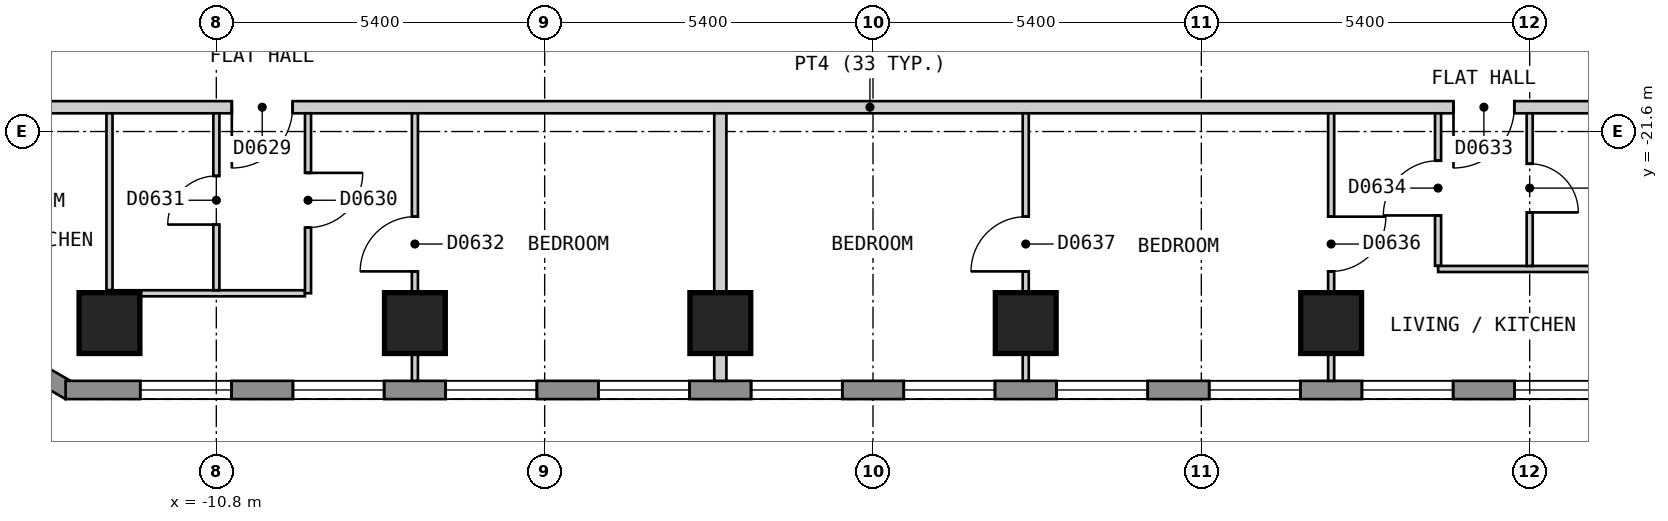
"""IFC4 building model, lengths in metres.
Left out: names, types, materials, properties, quantities, classifications, styles, units other than length and angle.
Written with IfcOpenShell. Run it as: python <this file> out.ifc"""

import sys

from ifc_helpers import new_model, si_unit, direction, frame, frame_2d, origin, origin_2d, place, context, subcontext, project, spatial, polyline, rectangle, outline, extrude, element, fill, save


model = new_model("IFC4")
c1 = context("Model", 3, precision=1e-05, world=origin(), true_north=direction((0.0, 1.0)))
c2 = subcontext(c1, "Body", "Model", "MODEL_VIEW")
j1 = project(units=[si_unit("LENGTHUNIT", "METRE"), si_unit("PLANEANGLEUNIT", "RADIAN")], contexts=[c1])
p1 = place(None, origin())
s1 = spatial("IfcSite", under=j1, at=p1, CompositionType="ELEMENT")
p2 = place(p1, origin())
s2 = spatial("IfcBuilding", under=s1, at=p2, CompositionType="ELEMENT")
p3 = place(p2, frame((0.0, 0.0, 75.0)))
s3 = spatial("IfcBuildingStorey", under=s2, at=p3, CompositionType="ELEMENT", Elevation=75.0)
for number, where, z_axis, x_axis in (
    (1, (-12.557, -24.75, 0.0), (0.0, 0.0, 1.0), (1.0, 0.0, 0.0)),
    (2, (-7.534, -24.75, 0.0), (0.0, 0.0, 1.0), (1.0, 0.0, 0.0)),
    (3, (-2.511, -24.75, 0.0), (0.0, 0.0, 1.0), (1.0, 0.0, 0.0)),
    (4, (2.512, -24.75, 0.0), (0.0, 0.0, 1.0), (1.0, 0.0, 0.0)),
    (5, (7.535, -24.75, 0.0), (0.0, 0.0, 1.0), (1.0, 0.0, 0.0)),
):
    element("IfcColumn", number, at=place(p3, frame(where, z_axis=z_axis, x_axis=x_axis)), inside=s3, PredefinedType="COLUMN", context=c2, shape_type="SweptSolid", body=[
        extrude(rectangle(XDim=1.0, YDim=1.0, at=origin_2d()), origin(), (0.0, 0.0, 1.0), 3.0),
    ])
p4 = place(p3, frame((-17.534, -23.37, 0.0), z_axis=(0.0, 0.0, 1.0), x_axis=(0.866010750942, -0.50002537861, 0.0)))
e6 = element("IfcWall", 6, at=p4, inside=s3, PredefinedType="SOLIDWALL", context=c2, shape_type="SweptSolid", body=[
    extrude(outline(polyline([(0.0, -0.15), (5.0, -0.15), (4.919, 0.15), (0.08, 0.15), (0.0, -0.15)])), origin(), (0.0, 0.0, 1.0), 2.7),
])
p5 = place(p4, frame((0.65, 0.0, 0.15)))
e7 = element("IfcOpeningElement", 7, at=p5, cuts=e6, PredefinedType="OPENING", context=c2, shape_type="SweptSolid", body=[
    extrude(rectangle(XDim=1.2, YDim=2.1, at=frame_2d((0.6, 1.05))), frame((0.0, 0.16, 0.0), z_axis=(0.0, -1.0, 0.0), x_axis=(1.0, 0.0, 0.0)), (0.0, 0.0, 1.0), 0.32),
])
p6 = place(p4, frame((3.15, 0.0, 0.15)))
e8 = element("IfcOpeningElement", 8, at=p6, cuts=e6, PredefinedType="OPENING", context=c2, shape_type="SweptSolid", body=[
    extrude(rectangle(XDim=1.2, YDim=2.1, at=frame_2d((0.6, 1.05))), frame((0.0, 0.16, 0.0), z_axis=(0.0, -1.0, 0.0), x_axis=(1.0, 0.0, 0.0)), (0.0, 0.0, 1.0), 0.32),
])
p7 = place(p3, frame((-13.279, -25.85, 0.0), z_axis=(0.0, 0.0, 1.0), x_axis=(1.0, 0.0, 0.0)))
e9 = element("IfcWall", 9, at=p7, inside=s3, PredefinedType="SOLIDWALL", context=c2, shape_type="SweptSolid", body=[
    extrude(outline(polyline([(0.0, -0.15), (26.558, -0.15), (26.478, 0.15), (0.08, 0.15), (0.0, -0.15)])), origin(), (0.0, 0.0, 1.0), 2.7),
])
p8 = place(p7, frame((1.228, 0.0, 0.15)))
e10 = element("IfcOpeningElement", 10, at=p8, cuts=e9, PredefinedType="OPENING", context=c2, shape_type="SweptSolid", body=[
    extrude(rectangle(XDim=1.5, YDim=2.1, at=frame_2d((0.75, 1.05))), frame((0.0, 0.16, 0.0), z_axis=(0.0, -1.0, 0.0), x_axis=(1.0, 0.0, 0.0)), (0.0, 0.0, 1.0), 0.32),
])
p9 = place(p7, frame((3.739, 0.0, 0.15)))
e11 = element("IfcOpeningElement", 11, at=p9, cuts=e9, PredefinedType="OPENING", context=c2, shape_type="SweptSolid", body=[
    extrude(rectangle(XDim=1.5, YDim=2.1, at=frame_2d((0.75, 1.05))), frame((0.0, 0.16, 0.0), z_axis=(0.0, -1.0, 0.0), x_axis=(1.0, 0.0, 0.0)), (0.0, 0.0, 1.0), 0.32),
])
p10 = place(p7, frame((6.251, 0.0, 0.15)))
e12 = element("IfcOpeningElement", 12, at=p10, cuts=e9, PredefinedType="OPENING", context=c2, shape_type="SweptSolid", body=[
    extrude(rectangle(XDim=1.5, YDim=2.1, at=frame_2d((0.75, 1.05))), frame((0.0, 0.16, 0.0), z_axis=(0.0, -1.0, 0.0), x_axis=(1.0, 0.0, 0.0)), (0.0, 0.0, 1.0), 0.32),
])
p11 = place(p7, frame((8.762, 0.0, 0.15)))
e13 = element("IfcOpeningElement", 13, at=p11, cuts=e9, PredefinedType="OPENING", context=c2, shape_type="SweptSolid", body=[
    extrude(rectangle(XDim=1.5, YDim=2.1, at=frame_2d((0.75, 1.05))), frame((0.0, 0.16, 0.0), z_axis=(0.0, -1.0, 0.0), x_axis=(1.0, 0.0, 0.0)), (0.0, 0.0, 1.0), 0.32),
])
p12 = place(p7, frame((11.274, 0.0, 0.15)))
e14 = element("IfcOpeningElement", 14, at=p12, cuts=e9, PredefinedType="OPENING", context=c2, shape_type="SweptSolid", body=[
    extrude(rectangle(XDim=1.5, YDim=2.1, at=frame_2d((0.75, 1.05))), frame((0.0, 0.16, 0.0), z_axis=(0.0, -1.0, 0.0), x_axis=(1.0, 0.0, 0.0)), (0.0, 0.0, 1.0), 0.32),
])
p13 = place(p7, frame((13.785, 0.0, 0.15)))
e15 = element("IfcOpeningElement", 15, at=p13, cuts=e9, PredefinedType="OPENING", context=c2, shape_type="SweptSolid", body=[
    extrude(rectangle(XDim=1.5, YDim=2.1, at=frame_2d((0.75, 1.05))), frame((0.0, 0.16, 0.0), z_axis=(0.0, -1.0, 0.0), x_axis=(1.0, 0.0, 0.0)), (0.0, 0.0, 1.0), 0.32),
])
p14 = place(p7, frame((16.297, 0.0, 0.15)))
e16 = element("IfcOpeningElement", 16, at=p14, cuts=e9, PredefinedType="OPENING", context=c2, shape_type="SweptSolid", body=[
    extrude(rectangle(XDim=1.5, YDim=2.1, at=frame_2d((0.75, 1.05))), frame((0.0, 0.16, 0.0), z_axis=(0.0, -1.0, 0.0), x_axis=(1.0, 0.0, 0.0)), (0.0, 0.0, 1.0), 0.32),
])
p15 = place(p7, frame((18.808, 0.0, 0.15)))
e17 = element("IfcOpeningElement", 17, at=p15, cuts=e9, PredefinedType="OPENING", context=c2, shape_type="SweptSolid", body=[
    extrude(rectangle(XDim=1.5, YDim=2.1, at=frame_2d((0.75, 1.05))), frame((0.0, 0.16, 0.0), z_axis=(0.0, -1.0, 0.0), x_axis=(1.0, 0.0, 0.0)), (0.0, 0.0, 1.0), 0.32),
])
p16 = place(p7, frame((21.32, 0.0, 0.15)))
e18 = element("IfcOpeningElement", 18, at=p16, cuts=e9, PredefinedType="OPENING", context=c2, shape_type="SweptSolid", body=[
    extrude(rectangle(XDim=1.5, YDim=2.1, at=frame_2d((0.75, 1.05))), frame((0.0, 0.16, 0.0), z_axis=(0.0, -1.0, 0.0), x_axis=(1.0, 0.0, 0.0)), (0.0, 0.0, 1.0), 0.32),
])
p17 = place(p7, frame((23.831, 0.0, 0.15)))
e19 = element("IfcOpeningElement", 19, at=p17, cuts=e9, PredefinedType="OPENING", context=c2, shape_type="SweptSolid", body=[
    extrude(rectangle(XDim=1.5, YDim=2.1, at=frame_2d((0.75, 1.05))), frame((0.0, 0.16, 0.0), z_axis=(0.0, -1.0, 0.0), x_axis=(1.0, 0.0, 0.0)), (0.0, 0.0, 1.0), 0.32),
])
p18 = place(p3, frame((-15.499, -21.2, 0.0), z_axis=(0.0, 0.0, 1.0), x_axis=(1.0, 0.0, 0.0)))
e20 = element("IfcWall", 20, at=p18, inside=s3, PredefinedType="PARTITIONING", context=c2, shape_type="SweptSolid", body=[
    extrude(rectangle(XDim=30.898, YDim=0.2, at=frame_2d((15.449, 0.0))), origin(), (0.0, 0.0, 1.0), 2.7),
])
p19 = place(p18, frame((4.954, 0.0, 0.0)))
e21 = element("IfcOpeningElement", 21, at=p19, cuts=e20, PredefinedType="OPENING", context=c2, shape_type="SweptSolid", body=[
    extrude(rectangle(XDim=1.0, YDim=2.1, at=frame_2d((0.5, 1.05))), frame((0.0, 0.11, 0.0), z_axis=(0.0, -1.0, 0.0), x_axis=(1.0, 0.0, 0.0)), (0.0, 0.0, 1.0), 0.22),
])
p20 = place(p18, frame((25.046, 0.0, 0.0)))
e22 = element("IfcOpeningElement", 22, at=p20, cuts=e20, PredefinedType="OPENING", context=c2, shape_type="SweptSolid", body=[
    extrude(rectangle(XDim=1.0, YDim=2.1, at=frame_2d((0.5, 1.05))), frame((0.0, 0.11, 0.0), z_axis=(0.0, -1.0, 0.0), x_axis=(1.0, 0.0, 0.0)), (0.0, 0.0, 1.0), 0.22),
])
p21 = place(p3, frame((-7.534, -21.3, 0.0), z_axis=(0.0, 0.0, 1.0), x_axis=(0.0, -1.0, 0.0)))
e23 = element("IfcWall", 23, at=p21, inside=s3, PredefinedType="PARTITIONING", context=c2, shape_type="SweptSolid", body=[
    extrude(rectangle(XDim=4.4, YDim=0.1, at=frame_2d((2.2, 0.0))), origin(), (0.0, 0.0, 1.0), 2.7),
])
p22 = place(p21, frame((1.7, 0.0, 0.0)))
e24 = element("IfcOpeningElement", 24, at=p22, cuts=e23, PredefinedType="OPENING", context=c2, shape_type="SweptSolid", body=[
    extrude(rectangle(XDim=0.9, YDim=2.1, at=frame_2d((0.45, 1.05))), frame((0.0, 0.06, 0.0), z_axis=(0.0, -1.0, 0.0), x_axis=(1.0, 0.0, 0.0)), (0.0, 0.0, 1.0), 0.12),
])
p23 = place(p3, frame((-12.557, -21.3, 0.0), z_axis=(0.0, 0.0, 1.0), x_axis=(0.0, -1.0, 0.0)))
e25 = element("IfcWall", 25, at=p23, inside=s3, PredefinedType="PARTITIONING", context=c2, shape_type="SweptSolid", body=[
    extrude(rectangle(XDim=2.909, YDim=0.1, at=frame_2d((1.455, 0.0))), origin(), (0.0, 0.0, 1.0), 2.7),
])
p24 = place(p3, frame((9.293, -21.3, 0.0), z_axis=(0.0, 0.0, 1.0), x_axis=(0.0, -1.0, 0.0)))
e26 = element("IfcWall", 26, at=p24, inside=s3, PredefinedType="PARTITIONING", context=c2, shape_type="SweptSolid", body=[
    extrude(rectangle(XDim=2.509, YDim=0.1, at=frame_2d((1.254, 0.0))), origin(), (0.0, 0.0, 1.0), 2.7),
])
p25 = place(p24, frame((0.78, 0.0, 0.0)))
e27 = element("IfcOpeningElement", 27, at=p25, cuts=e26, PredefinedType="OPENING", context=c2, shape_type="SweptSolid", body=[
    extrude(rectangle(XDim=0.9, YDim=2.1, at=frame_2d((0.45, 1.05))), frame((0.0, 0.06, 0.0), z_axis=(0.0, -1.0, 0.0), x_axis=(1.0, 0.0, 0.0)), (0.0, 0.0, 1.0), 0.12),
])
p26 = place(p3, frame((9.294, -23.86, 0.0), z_axis=(0.0, 0.0, 1.0), x_axis=(1.0, 0.0, 0.0)))
e28 = element("IfcWall", 28, at=p26, inside=s3, PredefinedType="PARTITIONING", context=c2, shape_type="SweptSolid", body=[
    extrude(rectangle(XDim=3.164, YDim=0.1, at=frame_2d((1.582, 0.0))), origin(), (0.0, 0.0, 1.0), 2.7),
])
p27 = place(p3, frame((-12.556, -24.26, 0.0), z_axis=(0.0, 0.0, 1.0), x_axis=(1.0, 0.0, 0.0)))
e29 = element("IfcWall", 29, at=p27, inside=s3, PredefinedType="PARTITIONING", context=c2, shape_type="SweptSolid", body=[
    extrude(rectangle(XDim=3.213, YDim=0.1, at=frame_2d((1.606, 0.0))), origin(), (0.0, 0.0, 1.0), 2.7),
])
p28 = place(p3, frame((7.535, -25.7, 0.0), z_axis=(0.0, 0.0, 1.0), x_axis=(0.0, 1.0, 0.0)))
e30 = element("IfcWall", 30, at=p28, inside=s3, PredefinedType="PARTITIONING", context=c2, shape_type="SweptSolid", body=[
    extrude(rectangle(XDim=4.4, YDim=0.1, at=frame_2d((2.2, 0.0))), origin(), (0.0, 0.0, 1.0), 2.7),
])
p29 = place(p28, frame((1.8, 0.0, 0.0)))
e31 = element("IfcOpeningElement", 31, at=p29, cuts=e30, PredefinedType="OPENING", context=c2, shape_type="SweptSolid", body=[
    extrude(rectangle(XDim=0.9, YDim=2.1, at=frame_2d((0.45, 1.05))), frame((0.0, 0.06, 0.0), z_axis=(0.0, -1.0, 0.0), x_axis=(1.0, 0.0, 0.0)), (0.0, 0.0, 1.0), 0.12),
])
p30 = place(p3, frame((10.8, -23.81, 0.0), z_axis=(0.0, 0.0, 1.0), x_axis=(0.0, 1.0, 0.0)))
e32 = element("IfcWall", 32, at=p30, inside=s3, PredefinedType="PARTITIONING", context=c2, shape_type="SweptSolid", body=[
    extrude(rectangle(XDim=2.51, YDim=0.1, at=frame_2d((1.255, 0.0))), origin(), (0.0, 0.0, 1.0), 2.7),
])
p31 = place(p30, frame((0.88, 0.0, 0.0)))
e33 = element("IfcOpeningElement", 33, at=p31, cuts=e32, PredefinedType="OPENING", context=c2, shape_type="SweptSolid", body=[
    extrude(rectangle(XDim=0.8, YDim=2.1, at=frame_2d((0.4, 1.05))), frame((0.0, 0.06, 0.0), z_axis=(0.0, -1.0, 0.0), x_axis=(1.0, 0.0, 0.0)), (0.0, 0.0, 1.0), 0.12),
])
p32 = place(p3, frame((2.512, -25.7, 0.0), z_axis=(0.0, 0.0, 1.0), x_axis=(0.0, 1.0, 0.0)))
e34 = element("IfcWall", 34, at=p32, inside=s3, PredefinedType="PARTITIONING", context=c2, shape_type="SweptSolid", body=[
    extrude(rectangle(XDim=4.4, YDim=0.1, at=frame_2d((2.2, 0.0))), origin(), (0.0, 0.0, 1.0), 2.7),
])
p33 = place(p32, frame((1.8, 0.0, 0.0)))
e35 = element("IfcOpeningElement", 35, at=p33, cuts=e34, PredefinedType="OPENING", context=c2, shape_type="SweptSolid", body=[
    extrude(rectangle(XDim=0.9, YDim=2.1, at=frame_2d((0.45, 1.05))), frame((0.0, 0.06, 0.0), z_axis=(0.0, -1.0, 0.0), x_axis=(1.0, 0.0, 0.0)), (0.0, 0.0, 1.0), 0.12),
])
p34 = place(p3, frame((-9.292, -24.259, 0.0), z_axis=(0.0, 0.0, 1.0), x_axis=(0.0, 1.0, 0.0)))
e36 = element("IfcWall", 36, at=p34, inside=s3, PredefinedType="PARTITIONING", context=c2, shape_type="SweptSolid", body=[
    extrude(rectangle(XDim=2.959, YDim=0.1, at=frame_2d((1.479, 0.0))), origin(), (0.0, 0.0, 1.0), 2.7),
])
p35 = place(p34, frame((1.079, 0.0, 0.0)))
e37 = element("IfcOpeningElement", 37, at=p35, cuts=e36, PredefinedType="OPENING", context=c2, shape_type="SweptSolid", body=[
    extrude(rectangle(XDim=0.9, YDim=2.1, at=frame_2d((0.45, 1.05))), frame((0.0, 0.06, 0.0), z_axis=(0.0, -1.0, 0.0), x_axis=(1.0, 0.0, 0.0)), (0.0, 0.0, 1.0), 0.12),
])
p36 = place(p3, frame((-10.799, -24.21, 0.0), z_axis=(0.0, 0.0, 1.0), x_axis=(0.0, 1.0, 0.0)))
e38 = element("IfcWall", 38, at=p36, inside=s3, PredefinedType="PARTITIONING", context=c2, shape_type="SweptSolid", body=[
    extrude(rectangle(XDim=2.91, YDim=0.1, at=frame_2d((1.455, 0.0))), origin(), (0.0, 0.0, 1.0), 2.7),
])
p37 = place(p36, frame((1.08, 0.0, 0.0)))
e39 = element("IfcOpeningElement", 39, at=p37, cuts=e38, PredefinedType="OPENING", context=c2, shape_type="SweptSolid", body=[
    extrude(rectangle(XDim=0.8, YDim=2.1, at=frame_2d((0.4, 1.05))), frame((0.0, 0.06, 0.0), z_axis=(0.0, -1.0, 0.0), x_axis=(1.0, 0.0, 0.0)), (0.0, 0.0, 1.0), 0.12),
])
p38 = place(p3, frame((-2.511, -25.7, 0.0), z_axis=(0.0, 0.0, 1.0), x_axis=(0.0, 1.0, 0.0)))
e40 = element("IfcWall", 40, at=p38, inside=s3, PredefinedType="PARTITIONING", context=c2, shape_type="SweptSolid", body=[
    extrude(rectangle(XDim=4.4, YDim=0.2, at=frame_2d((2.2, 0.0))), origin(), (0.0, 0.0, 1.0), 2.7),
])
p39 = place(p8, origin())
e41 = element("IfcWindow", 41, at=p39, inside=s3, PartitioningType="SINGLE_PANEL", PredefinedType="WINDOW", context=c2, shape_type="SweptSolid", body=[
    extrude(rectangle(XDim=1.5, YDim=2.1, at=frame_2d((0.75, 1.05))), frame((0.0, 0.03, 0.0), z_axis=(0.0, -1.0, 0.0), x_axis=(1.0, 0.0, 0.0)), (0.0, 0.0, 1.0), 0.06),
])
fill(e10, e41)
p40 = place(p9, origin())
e42 = element("IfcWindow", 42, at=p40, inside=s3, PartitioningType="SINGLE_PANEL", PredefinedType="WINDOW", context=c2, shape_type="SweptSolid", body=[
    extrude(rectangle(XDim=1.5, YDim=2.1, at=frame_2d((0.75, 1.05))), frame((0.0, 0.03, 0.0), z_axis=(0.0, -1.0, 0.0), x_axis=(1.0, 0.0, 0.0)), (0.0, 0.0, 1.0), 0.06),
])
fill(e11, e42)
p41 = place(p10, origin())
e43 = element("IfcWindow", 43, at=p41, inside=s3, PartitioningType="SINGLE_PANEL", PredefinedType="WINDOW", context=c2, shape_type="SweptSolid", body=[
    extrude(rectangle(XDim=1.5, YDim=2.1, at=frame_2d((0.75, 1.05))), frame((0.0, 0.03, 0.0), z_axis=(0.0, -1.0, 0.0), x_axis=(1.0, 0.0, 0.0)), (0.0, 0.0, 1.0), 0.06),
])
fill(e12, e43)
p42 = place(p11, origin())
e44 = element("IfcWindow", 44, at=p42, inside=s3, PartitioningType="SINGLE_PANEL", PredefinedType="WINDOW", context=c2, shape_type="SweptSolid", body=[
    extrude(rectangle(XDim=1.5, YDim=2.1, at=frame_2d((0.75, 1.05))), frame((0.0, 0.03, 0.0), z_axis=(0.0, -1.0, 0.0), x_axis=(1.0, 0.0, 0.0)), (0.0, 0.0, 1.0), 0.06),
])
fill(e13, e44)
p43 = place(p12, origin())
e45 = element("IfcWindow", 45, at=p43, inside=s3, PartitioningType="SINGLE_PANEL", PredefinedType="WINDOW", context=c2, shape_type="SweptSolid", body=[
    extrude(rectangle(XDim=1.5, YDim=2.1, at=frame_2d((0.75, 1.05))), frame((0.0, 0.03, 0.0), z_axis=(0.0, -1.0, 0.0), x_axis=(1.0, 0.0, 0.0)), (0.0, 0.0, 1.0), 0.06),
])
fill(e14, e45)
p44 = place(p13, origin())
e46 = element("IfcWindow", 46, at=p44, inside=s3, PartitioningType="SINGLE_PANEL", PredefinedType="WINDOW", context=c2, shape_type="SweptSolid", body=[
    extrude(rectangle(XDim=1.5, YDim=2.1, at=frame_2d((0.75, 1.05))), frame((0.0, 0.03, 0.0), z_axis=(0.0, -1.0, 0.0), x_axis=(1.0, 0.0, 0.0)), (0.0, 0.0, 1.0), 0.06),
])
fill(e15, e46)
p45 = place(p14, origin())
e47 = element("IfcWindow", 47, at=p45, inside=s3, PartitioningType="SINGLE_PANEL", PredefinedType="WINDOW", context=c2, shape_type="SweptSolid", body=[
    extrude(rectangle(XDim=1.5, YDim=2.1, at=frame_2d((0.75, 1.05))), frame((0.0, 0.03, 0.0), z_axis=(0.0, -1.0, 0.0), x_axis=(1.0, 0.0, 0.0)), (0.0, 0.0, 1.0), 0.06),
])
fill(e16, e47)
p46 = place(p15, origin())
e48 = element("IfcWindow", 48, at=p46, inside=s3, PartitioningType="SINGLE_PANEL", PredefinedType="WINDOW", context=c2, shape_type="SweptSolid", body=[
    extrude(rectangle(XDim=1.5, YDim=2.1, at=frame_2d((0.75, 1.05))), frame((0.0, 0.03, 0.0), z_axis=(0.0, -1.0, 0.0), x_axis=(1.0, 0.0, 0.0)), (0.0, 0.0, 1.0), 0.06),
])
fill(e17, e48)
p47 = place(p16, origin())
e49 = element("IfcWindow", 49, at=p47, inside=s3, PartitioningType="SINGLE_PANEL", PredefinedType="WINDOW", context=c2, shape_type="SweptSolid", body=[
    extrude(rectangle(XDim=1.5, YDim=2.1, at=frame_2d((0.75, 1.05))), frame((0.0, 0.03, 0.0), z_axis=(0.0, -1.0, 0.0), x_axis=(1.0, 0.0, 0.0)), (0.0, 0.0, 1.0), 0.06),
])
fill(e18, e49)
p48 = place(p17, origin())
e50 = element("IfcWindow", 50, at=p48, inside=s3, PartitioningType="SINGLE_PANEL", PredefinedType="WINDOW", context=c2, shape_type="SweptSolid", body=[
    extrude(rectangle(XDim=1.5, YDim=2.1, at=frame_2d((0.75, 1.05))), frame((0.0, 0.03, 0.0), z_axis=(0.0, -1.0, 0.0), x_axis=(1.0, 0.0, 0.0)), (0.0, 0.0, 1.0), 0.06),
])
fill(e19, e50)
p49 = place(p19, origin())
e51 = element("IfcDoor", 51, at=p49, inside=s3, OperationType="SINGLE_SWING_LEFT", PredefinedType="DOOR", context=c2, shape_type="SweptSolid", body=[
    extrude(rectangle(XDim=1.0, YDim=2.1, at=frame_2d((0.5, 1.05))), frame((0.0, 0.025, 0.0), z_axis=(0.0, -1.0, 0.0), x_axis=(1.0, 0.0, 0.0)), (0.0, 0.0, 1.0), 0.05),
])
fill(e21, e51)
p50 = place(p35, origin())
e52 = element("IfcDoor", 52, at=p50, inside=s3, OperationType="SINGLE_SWING_RIGHT", PredefinedType="DOOR", context=c2, shape_type="SweptSolid", body=[
    extrude(rectangle(XDim=0.9, YDim=2.1, at=frame_2d((0.45, 1.05))), frame((0.0, 0.025, 0.0), z_axis=(0.0, -1.0, 0.0), x_axis=(1.0, 0.0, 0.0)), (0.0, 0.0, 1.0), 0.05),
])
fill(e37, e52)
p51 = place(p37, origin())
e53 = element("IfcDoor", 53, at=p51, inside=s3, OperationType="SINGLE_SWING_LEFT", PredefinedType="DOOR", context=c2, shape_type="SweptSolid", body=[
    extrude(rectangle(XDim=0.8, YDim=2.1, at=frame_2d((0.4, 1.05))), frame((0.0, 0.025, 0.0), z_axis=(0.0, -1.0, 0.0), x_axis=(1.0, 0.0, 0.0)), (0.0, 0.0, 1.0), 0.05),
])
fill(e39, e53)
p52 = place(p22, origin())
e54 = element("IfcDoor", 54, at=p52, inside=s3, OperationType="SINGLE_SWING_RIGHT", PredefinedType="DOOR", context=c2, shape_type="SweptSolid", body=[
    extrude(rectangle(XDim=0.9, YDim=2.1, at=frame_2d((0.45, 1.05))), frame((0.0, 0.025, 0.0), z_axis=(0.0, -1.0, 0.0), x_axis=(1.0, 0.0, 0.0)), (0.0, 0.0, 1.0), 0.05),
])
fill(e24, e54)
p53 = place(p20, origin())
e55 = element("IfcDoor", 55, at=p53, inside=s3, OperationType="SINGLE_SWING_LEFT", PredefinedType="DOOR", context=c2, shape_type="SweptSolid", body=[
    extrude(rectangle(XDim=1.0, YDim=2.1, at=frame_2d((0.5, 1.05))), frame((0.0, 0.025, 0.0), z_axis=(0.0, -1.0, 0.0), x_axis=(1.0, 0.0, 0.0)), (0.0, 0.0, 1.0), 0.05),
])
fill(e22, e55)
p54 = place(p25, origin())
e56 = element("IfcDoor", 56, at=p54, inside=s3, OperationType="SINGLE_SWING_RIGHT", PredefinedType="DOOR", context=c2, shape_type="SweptSolid", body=[
    extrude(rectangle(XDim=0.9, YDim=2.1, at=frame_2d((0.45, 1.05))), frame((0.0, 0.025, 0.0), z_axis=(0.0, -1.0, 0.0), x_axis=(1.0, 0.0, 0.0)), (0.0, 0.0, 1.0), 0.05),
])
fill(e27, e56)
p55 = place(p31, origin())
e57 = element("IfcDoor", 57, at=p55, inside=s3, OperationType="SINGLE_SWING_LEFT", PredefinedType="DOOR", context=c2, shape_type="SweptSolid", body=[
    extrude(rectangle(XDim=0.8, YDim=2.1, at=frame_2d((0.4, 1.05))), frame((0.0, 0.025, 0.0), z_axis=(0.0, -1.0, 0.0), x_axis=(1.0, 0.0, 0.0)), (0.0, 0.0, 1.0), 0.05),
])
fill(e33, e57)
p56 = place(p29, origin())
e58 = element("IfcDoor", 58, at=p56, inside=s3, OperationType="SINGLE_SWING_RIGHT", PredefinedType="DOOR", context=c2, shape_type="SweptSolid", body=[
    extrude(rectangle(XDim=0.9, YDim=2.1, at=frame_2d((0.45, 1.05))), frame((0.0, 0.025, 0.0), z_axis=(0.0, -1.0, 0.0), x_axis=(1.0, 0.0, 0.0)), (0.0, 0.0, 1.0), 0.05),
])
fill(e31, e58)
p57 = place(p33, origin())
e59 = element("IfcDoor", 59, at=p57, inside=s3, OperationType="SINGLE_SWING_LEFT", PredefinedType="DOOR", context=c2, shape_type="SweptSolid", body=[
    extrude(rectangle(XDim=0.9, YDim=2.1, at=frame_2d((0.45, 1.05))), frame((0.0, 0.025, 0.0), z_axis=(0.0, -1.0, 0.0), x_axis=(1.0, 0.0, 0.0)), (0.0, 0.0, 1.0), 0.05),
])
fill(e35, e59)
save(model, sys.argv[1])
